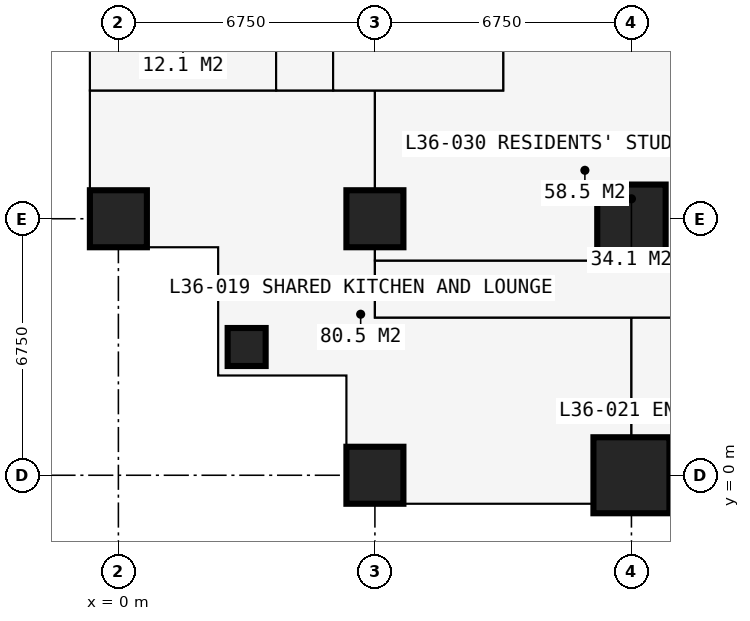
"""IFC4 building model, lengths in metres.
Left out: names, types, materials, properties, quantities, classifications, styles, units other than length and angle.
Written with IfcOpenShell. Run it as: python <this file> out.ifc"""

import sys

from ifc_helpers import new_model, si_unit, direction, frame, frame_2d, origin, origin_2d, place, context, subcontext, project, spatial, rectangle, extrude, element, fill, save


model = new_model("IFC4")
c1 = context("Model", 3, precision=1e-05, world=origin(), true_north=direction((0.0, 1.0)))
c2 = subcontext(c1, "Body", "Model", "MODEL_VIEW")
j1 = project(units=[si_unit("LENGTHUNIT", "METRE"), si_unit("PLANEANGLEUNIT", "RADIAN")], contexts=[c1])
p1 = place(None, origin())
s1 = spatial("IfcSite", under=j1, at=p1, CompositionType="ELEMENT")
p2 = place(p1, origin())
s2 = spatial("IfcBuilding", under=s1, at=p2, CompositionType="ELEMENT")
p3 = place(p2, frame((0.0, 0.0, 134.1)))
s3 = spatial("IfcBuildingStorey", under=s2, at=p3, CompositionType="ELEMENT", Elevation=134.1)
p4 = place(p3, frame((0.0, 6.75, 0.0), z_axis=(0.0, 0.0, 1.0), x_axis=(1.0, 0.0, 0.0)))
e1 = element("IfcColumn", 1, at=p4, inside=s3, PredefinedType="COLUMN", context=c2, shape_type="SweptSolid", body=[
    extrude(rectangle(XDim=1.5, YDim=1.5, at=origin_2d()), origin(), (0.0, 0.0, 1.0), 3.6),
])
p5 = place(p3, frame((3.375, 3.375, 0.0), z_axis=(0.0, 0.0, 1.0), x_axis=(1.0, 0.0, 0.0)))
e2 = element("IfcColumn", 2, at=p5, inside=s3, PredefinedType="COLUMN", context=c2, shape_type="SweptSolid", body=[
    extrude(rectangle(XDim=1.0, YDim=1.0, at=origin_2d()), origin(), (0.0, 0.0, 1.0), 3.6),
])
for number, where, z_axis, x_axis in (
    (3, (6.75, 0.0, 0.0), (0.0, 0.0, 1.0), (1.0, 0.0, 0.0)),
    (4, (6.75, 6.75, 0.0), (0.0, 0.0, 1.0), (1.0, 0.0, 0.0)),
):
    element("IfcColumn", number, at=place(p3, frame(where, z_axis=z_axis, x_axis=x_axis)), inside=s3, PredefinedType="COLUMN", context=c2, shape_type="SweptSolid", body=[
        extrude(rectangle(XDim=1.5, YDim=1.5, at=origin_2d()), origin(), (0.0, 0.0, 1.0), 3.6),
    ])
p6 = place(p3, frame((13.5, 0.0, 0.0), z_axis=(0.0, 0.0, 1.0), x_axis=(1.0, 0.0, 0.0)))
e5 = element("IfcColumn", 5, at=p6, inside=s3, PredefinedType="COLUMN", context=c2, shape_type="SweptSolid", body=[
    extrude(rectangle(XDim=2.0, YDim=2.0, at=origin_2d()), origin(), (0.0, 0.0, 1.0), 3.6),
])
p7 = place(p3, frame((13.5, 6.75, 0.0), z_axis=(0.0, 0.0, 1.0), x_axis=(1.0, 0.0, 0.0)))
e6 = element("IfcColumn", 6, at=p7, inside=s3, PredefinedType="COLUMN", context=c2, shape_type="SweptSolid", body=[
    extrude(rectangle(XDim=1.8, YDim=1.8, at=origin_2d()), origin(), (0.0, 0.0, 1.0), 3.6),
])
p8 = place(p3, frame((-0.75, 6.0, 0.0), z_axis=(0.0, 0.0, 1.0), x_axis=(1.0, 0.0, 0.0)))
e7 = element("IfcWall", 7, at=p8, inside=s3, PredefinedType="SOLIDWALL", context=c2, shape_type="SweptSolid", body=[
    extrude(rectangle(XDim=3.375, YDim=0.3, at=frame_2d((1.688, 0.0))), origin(), (0.0, 0.0, 1.0), 3.3),
])
p9 = place(p8, frame((1.607, 0.0, 0.9)))
e8 = element("IfcOpeningElement", 8, at=p9, cuts=e7, PredefinedType="OPENING", context=c2, shape_type="SweptSolid", body=[
    extrude(rectangle(XDim=1.5, YDim=1.8, at=frame_2d((0.75, 0.9))), frame((0.0, 0.16, 0.0), z_axis=(0.0, -1.0, 0.0), x_axis=(1.0, 0.0, 0.0)), (0.0, 0.0, 1.0), 0.32),
])
p10 = place(p3, frame((2.625, 6.0, 0.0), z_axis=(0.0, 0.0, 1.0), x_axis=(0.0, -1.0, 0.0)))
e9 = element("IfcWall", 9, at=p10, inside=s3, PredefinedType="SOLIDWALL", context=c2, shape_type="SweptSolid", body=[
    extrude(rectangle(XDim=3.375, YDim=0.3, at=frame_2d((1.688, 0.0))), origin(), (0.0, 0.0, 1.0), 3.3),
])
p11 = place(p10, frame((0.788, 0.0, 0.6)))
e10 = element("IfcOpeningElement", 10, at=p11, cuts=e9, PredefinedType="OPENING", context=c2, shape_type="SweptSolid", body=[
    extrude(rectangle(XDim=1.8, YDim=2.1, at=frame_2d((0.9, 1.05))), frame((0.0, 0.16, 0.0), z_axis=(0.0, -1.0, 0.0), x_axis=(1.0, 0.0, 0.0)), (0.0, 0.0, 1.0), 0.32),
])
p12 = place(p3, frame((2.625, 2.625, 0.0), z_axis=(0.0, 0.0, 1.0), x_axis=(1.0, 0.0, 0.0)))
e11 = element("IfcWall", 11, at=p12, inside=s3, PredefinedType="SOLIDWALL", context=c2, shape_type="SweptSolid", body=[
    extrude(rectangle(XDim=3.375, YDim=0.3, at=frame_2d((1.688, 0.0))), origin(), (0.0, 0.0, 1.0), 3.3),
])
p13 = place(p12, frame((0.788, 0.0, 0.6)))
e12 = element("IfcOpeningElement", 12, at=p13, cuts=e11, PredefinedType="OPENING", context=c2, shape_type="SweptSolid", body=[
    extrude(rectangle(XDim=1.8, YDim=2.1, at=frame_2d((0.9, 1.05))), frame((0.0, 0.16, 0.0), z_axis=(0.0, -1.0, 0.0), x_axis=(1.0, 0.0, 0.0)), (0.0, 0.0, 1.0), 0.32),
])
p14 = place(p3, frame((6.0, 2.625, 0.0), z_axis=(0.0, 0.0, 1.0), x_axis=(0.0, -1.0, 0.0)))
e13 = element("IfcWall", 13, at=p14, inside=s3, PredefinedType="SOLIDWALL", context=c2, shape_type="SweptSolid", body=[
    extrude(rectangle(XDim=3.375, YDim=0.3, at=frame_2d((1.688, 0.0))), origin(), (0.0, 0.0, 1.0), 3.3),
])
p15 = place(p14, frame((0.268, 0.0, 0.9)))
e14 = element("IfcOpeningElement", 14, at=p15, cuts=e13, PredefinedType="OPENING", context=c2, shape_type="SweptSolid", body=[
    extrude(rectangle(XDim=1.5, YDim=1.8, at=frame_2d((0.75, 0.9))), frame((0.0, 0.16, 0.0), z_axis=(0.0, -1.0, 0.0), x_axis=(1.0, 0.0, 0.0)), (0.0, 0.0, 1.0), 0.32),
])
p16 = place(p3, frame((-0.734, 10.125, 0.0), z_axis=(0.0, 0.0, 1.0), x_axis=(1.0, 0.0, 0.0)))
e15 = element("IfcWall", 15, at=p16, inside=s3, PredefinedType="PARTITIONING", context=c2, shape_type="SweptSolid", body=[
    extrude(rectangle(XDim=10.859, YDim=0.15, at=frame_2d((5.429, 0.0))), origin(), (0.0, 0.0, 1.0), 3.3),
])
p17 = place(p3, frame((4.15, 10.125, 0.0), z_axis=(0.0, 0.0, 1.0), x_axis=(0.0, 1.0, 0.0)))
e16 = element("IfcWall", 16, at=p17, inside=s3, PredefinedType="PARTITIONING", context=c2, shape_type="SweptSolid", body=[
    extrude(rectangle(XDim=16.875, YDim=0.15, at=frame_2d((8.438, 0.0))), origin(), (0.0, 0.0, 1.0), 3.3),
])
p18 = place(p17, frame((13.7, 0.0, 0.0)))
e17 = element("IfcOpeningElement", 17, at=p18, cuts=e16, PredefinedType="OPENING", context=c2, shape_type="SweptSolid", body=[
    extrude(rectangle(XDim=0.95, YDim=2.2, at=frame_2d((0.475, 1.1))), frame((0.0, 0.085, 0.0), z_axis=(0.0, -1.0, 0.0), x_axis=(1.0, 0.0, 0.0)), (0.0, 0.0, 1.0), 0.17),
])
p19 = place(p17, frame((7.575, 0.0, 0.0)))
e18 = element("IfcOpeningElement", 18, at=p19, cuts=e16, PredefinedType="OPENING", context=c2, shape_type="SweptSolid", body=[
    extrude(rectangle(XDim=0.95, YDim=2.2, at=frame_2d((0.475, 1.1))), frame((0.0, 0.085, 0.0), z_axis=(0.0, -1.0, 0.0), x_axis=(1.0, 0.0, 0.0)), (0.0, 0.0, 1.0), 0.17),
])
p20 = place(p17, frame((0.2, 0.0, 0.0)))
e19 = element("IfcOpeningElement", 19, at=p20, cuts=e16, PredefinedType="OPENING", context=c2, shape_type="SweptSolid", body=[
    extrude(rectangle(XDim=0.95, YDim=2.2, at=frame_2d((0.475, 1.1))), frame((0.0, 0.085, 0.0), z_axis=(0.0, -1.0, 0.0), x_axis=(1.0, 0.0, 0.0)), (0.0, 0.0, 1.0), 0.17),
])
p21 = place(p17, frame((10.375, 0.0, 0.0)))
e20 = element("IfcOpeningElement", 20, at=p21, cuts=e16, PredefinedType="OPENING", context=c2, shape_type="SweptSolid", body=[
    extrude(rectangle(XDim=0.95, YDim=2.2, at=frame_2d((0.475, 1.1))), frame((0.0, 0.085, 0.0), z_axis=(0.0, -1.0, 0.0), x_axis=(1.0, 0.0, 0.0)), (0.0, 0.0, 1.0), 0.17),
])
p22 = place(p3, frame((5.65, 10.125, 0.0), z_axis=(0.0, 0.0, 1.0), x_axis=(0.0, 1.0, 0.0)))
e21 = element("IfcWall", 21, at=p22, inside=s3, PredefinedType="PARTITIONING", context=c2, shape_type="SweptSolid", body=[
    extrude(rectangle(XDim=10.762, YDim=0.15, at=frame_2d((5.381, 0.0))), origin(), (0.0, 0.0, 1.0), 3.3),
])
p23 = place(p22, frame((4.9, 0.0, 0.0)))
e22 = element("IfcOpeningElement", 22, at=p23, cuts=e21, PredefinedType="OPENING", context=c2, shape_type="SweptSolid", body=[
    extrude(rectangle(XDim=0.95, YDim=2.2, at=frame_2d((0.475, 1.1))), frame((0.0, 0.085, 0.0), z_axis=(0.0, -1.0, 0.0), x_axis=(1.0, 0.0, 0.0)), (0.0, 0.0, 1.0), 0.17),
])
p24 = place(p3, frame((6.75, 4.15, 0.0), z_axis=(0.0, 0.0, 1.0), x_axis=(0.0, 1.0, 0.0)))
e23 = element("IfcWall", 23, at=p24, inside=s3, PredefinedType="PARTITIONING", context=c2, shape_type="SweptSolid", body=[
    extrude(rectangle(XDim=5.975, YDim=0.15, at=frame_2d((2.988, 0.0))), origin(), (0.0, 0.0, 1.0), 2.802),
])
p25 = place(p3, frame((6.75, 4.15, 0.0), z_axis=(0.0, 0.0, 1.0), x_axis=(1.0, 0.0, 0.0)))
e24 = element("IfcWall", 24, at=p25, inside=s3, PredefinedType="PARTITIONING", context=c2, shape_type="SweptSolid", body=[
    extrude(rectangle(XDim=23.625, YDim=0.1, at=frame_2d((11.812, 0.0))), origin(), (0.0, 0.0, 1.0), 3.3),
])
p26 = place(p25, frame((2.85, 0.0, 0.0)))
e25 = element("IfcOpeningElement", 25, at=p26, cuts=e24, PredefinedType="OPENING", context=c2, shape_type="SweptSolid", body=[
    extrude(rectangle(XDim=1.0, YDim=2.2, at=frame_2d((0.5, 1.1))), frame((0.0, 0.06, 0.0), z_axis=(0.0, -1.0, 0.0), x_axis=(1.0, 0.0, 0.0)), (0.0, 0.0, 1.0), 0.12),
])
p27 = place(p25, frame((6.95, 0.0, 0.0)))
e26 = element("IfcOpeningElement", 26, at=p27, cuts=e24, PredefinedType="OPENING", context=c2, shape_type="SweptSolid", body=[
    extrude(rectangle(XDim=0.95, YDim=2.2, at=frame_2d((0.475, 1.1))), frame((0.0, 0.06, 0.0), z_axis=(0.0, -1.0, 0.0), x_axis=(1.0, 0.0, 0.0)), (0.0, 0.0, 1.0), 0.12),
])
p28 = place(p25, frame((10.375, 0.0, 0.0)))
e27 = element("IfcOpeningElement", 27, at=p28, cuts=e24, PredefinedType="OPENING", context=c2, shape_type="SweptSolid", body=[
    extrude(rectangle(XDim=0.95, YDim=2.2, at=frame_2d((0.475, 1.1))), frame((0.0, 0.06, 0.0), z_axis=(0.0, -1.0, 0.0), x_axis=(1.0, 0.0, 0.0)), (0.0, 0.0, 1.0), 0.12),
])
p29 = place(p25, frame((15.1, 0.0, 0.0)))
e28 = element("IfcOpeningElement", 28, at=p29, cuts=e24, PredefinedType="OPENING", context=c2, shape_type="SweptSolid", body=[
    extrude(rectangle(XDim=0.95, YDim=2.2, at=frame_2d((0.475, 1.1))), frame((0.0, 0.06, 0.0), z_axis=(0.0, -1.0, 0.0), x_axis=(1.0, 0.0, 0.0)), (0.0, 0.0, 1.0), 0.12),
])
p30 = place(p25, frame((20.5, 0.0, 0.0)))
e29 = element("IfcOpeningElement", 29, at=p30, cuts=e24, PredefinedType="OPENING", context=c2, shape_type="SweptSolid", body=[
    extrude(rectangle(XDim=0.95, YDim=2.2, at=frame_2d((0.475, 1.1))), frame((0.0, 0.06, 0.0), z_axis=(0.0, -1.0, 0.0), x_axis=(1.0, 0.0, 0.0)), (0.0, 0.0, 1.0), 0.12),
])
p31 = place(p3, frame((6.75, 5.65, 0.0), z_axis=(0.0, 0.0, 1.0), x_axis=(1.0, 0.0, 0.0)))
e30 = element("IfcWall", 30, at=p31, inside=s3, PredefinedType="PARTITIONING", context=c2, shape_type="SweptSolid", body=[
    extrude(rectangle(XDim=11.05, YDim=0.15, at=frame_2d((5.525, 0.0))), origin(), (0.0, 0.0, 1.0), 3.3),
])
p32 = place(p3, frame((10.125, 10.125, 0.0), z_axis=(0.0, 0.0, 1.0), x_axis=(0.0, 1.0, 0.0)))
e31 = element("IfcWall", 31, at=p32, inside=s3, PredefinedType="PARTITIONING", context=c2, shape_type="SweptSolid", body=[
    extrude(rectangle(XDim=1.175, YDim=0.15, at=frame_2d((0.587, 0.0))), origin(), (0.0, 0.0, 1.0), 3.3),
])
p33 = place(p3, frame((13.5, -0.734, 0.0), z_axis=(0.0, 0.0, 1.0), x_axis=(0.0, 1.0, 0.0)))
e32 = element("IfcWall", 32, at=p33, inside=s3, PredefinedType="PARTITIONING", context=c2, shape_type="SweptSolid", body=[
    extrude(rectangle(XDim=4.884, YDim=0.15, at=frame_2d((2.442, 0.0))), origin(), (0.0, 0.0, 1.0), 2.802),
])
p34 = place(p9, origin())
e33 = element("IfcWindow", 33, at=p34, inside=s3, PartitioningType="SINGLE_PANEL", PredefinedType="WINDOW", context=c2, shape_type="SweptSolid", body=[
    extrude(rectangle(XDim=1.5, YDim=1.8, at=frame_2d((0.75, 0.9))), frame((0.0, 0.03, 0.0), z_axis=(0.0, -1.0, 0.0), x_axis=(1.0, 0.0, 0.0)), (0.0, 0.0, 1.0), 0.06),
])
fill(e8, e33)
p35 = place(p11, origin())
e34 = element("IfcWindow", 34, at=p35, inside=s3, PartitioningType="SINGLE_PANEL", PredefinedType="WINDOW", context=c2, shape_type="SweptSolid", body=[
    extrude(rectangle(XDim=1.8, YDim=2.1, at=frame_2d((0.9, 1.05))), frame((0.0, 0.03, 0.0), z_axis=(0.0, -1.0, 0.0), x_axis=(1.0, 0.0, 0.0)), (0.0, 0.0, 1.0), 0.06),
])
fill(e10, e34)
p36 = place(p13, origin())
e35 = element("IfcWindow", 35, at=p36, inside=s3, PartitioningType="SINGLE_PANEL", PredefinedType="WINDOW", context=c2, shape_type="SweptSolid", body=[
    extrude(rectangle(XDim=1.8, YDim=2.1, at=frame_2d((0.9, 1.05))), frame((0.0, 0.03, 0.0), z_axis=(0.0, -1.0, 0.0), x_axis=(1.0, 0.0, 0.0)), (0.0, 0.0, 1.0), 0.06),
])
fill(e12, e35)
p37 = place(p15, origin())
e36 = element("IfcWindow", 36, at=p37, inside=s3, PartitioningType="SINGLE_PANEL", PredefinedType="WINDOW", context=c2, shape_type="SweptSolid", body=[
    extrude(rectangle(XDim=1.5, YDim=1.8, at=frame_2d((0.75, 0.9))), frame((0.0, 0.03, 0.0), z_axis=(0.0, -1.0, 0.0), x_axis=(1.0, 0.0, 0.0)), (0.0, 0.0, 1.0), 0.06),
])
fill(e14, e36)
p38 = place(p26, origin())
e37 = element("IfcDoor", 37, at=p38, inside=s3, OperationType="SINGLE_SWING_LEFT", PredefinedType="DOOR", context=c2, shape_type="SweptSolid", body=[
    extrude(rectangle(XDim=1.0, YDim=2.2, at=frame_2d((0.5, 1.1))), frame((0.0, 0.025, 0.0), z_axis=(0.0, -1.0, 0.0), x_axis=(1.0, 0.0, 0.0)), (0.0, 0.0, 1.0), 0.05),
])
fill(e25, e37)
p39 = place(p27, origin())
e38 = element("IfcDoor", 38, at=p39, inside=s3, OperationType="SINGLE_SWING_LEFT", PredefinedType="DOOR", context=c2, shape_type="SweptSolid", body=[
    extrude(rectangle(XDim=0.95, YDim=2.2, at=frame_2d((0.475, 1.1))), frame((0.0, 0.025, 0.0), z_axis=(0.0, -1.0, 0.0), x_axis=(1.0, 0.0, 0.0)), (0.0, 0.0, 1.0), 0.05),
])
fill(e26, e38)
p40 = place(p20, origin())
e39 = element("IfcDoor", 39, at=p40, inside=s3, OperationType="SINGLE_SWING_LEFT", PredefinedType="DOOR", context=c2, shape_type="SweptSolid", body=[
    extrude(rectangle(XDim=0.95, YDim=2.2, at=frame_2d((0.475, 1.1))), frame((0.0, 0.025, 0.0), z_axis=(0.0, -1.0, 0.0), x_axis=(1.0, 0.0, 0.0)), (0.0, 0.0, 1.0), 0.05),
])
fill(e19, e39)
save(model, sys.argv[1])
